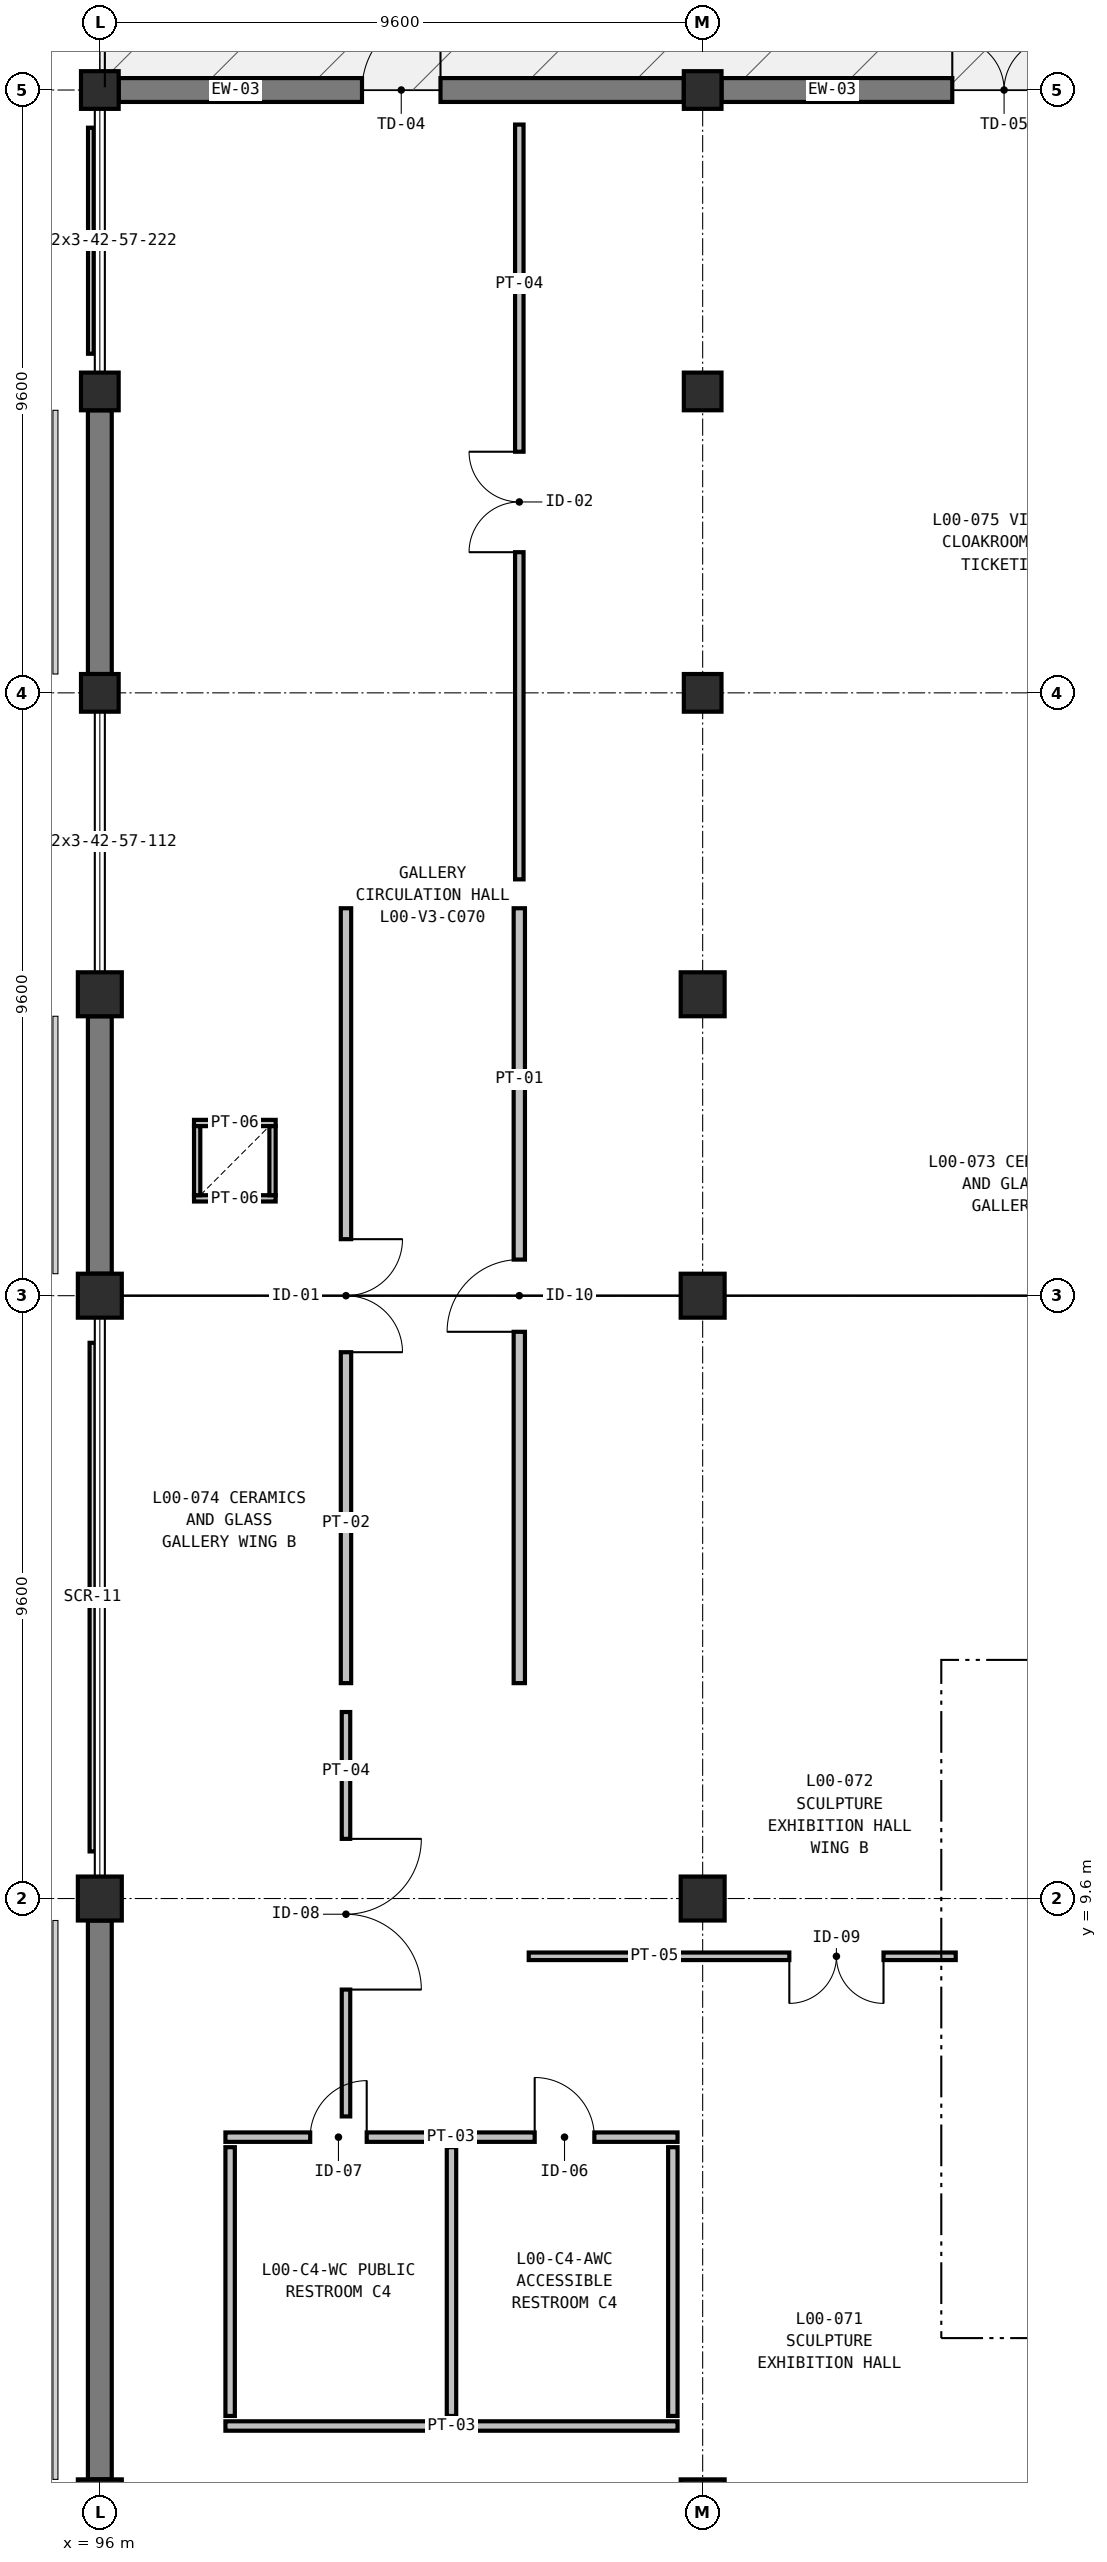
"""IFC4 building model, lengths in metres.
Left out: names, types, materials, properties, quantities, classifications, styles, units other than length and angle.
Written with IfcOpenShell. Run it as: python <this file> out.ifc"""

import sys

from ifc_helpers import new_model, si_unit, direction, frame, frame_2d, origin, origin_2d, place, context, subcontext, project, spatial, rectangle, extrude, element, fill, save


model = new_model("IFC4")
c1 = context("Model", 3, precision=1e-05, world=origin(), true_north=direction((0.0, 1.0)))
c2 = subcontext(c1, "Body", "Model", "MODEL_VIEW")
j1 = project(units=[si_unit("LENGTHUNIT", "METRE"), si_unit("PLANEANGLEUNIT", "RADIAN")], contexts=[c1])
p1 = place(None, origin())
s1 = spatial("IfcSite", under=j1, at=p1, CompositionType="ELEMENT")
p2 = place(p1, origin())
s2 = spatial("IfcBuilding", under=s1, at=p2, CompositionType="ELEMENT")
p3 = place(p2, origin())
s3 = spatial("IfcBuildingStorey", under=s2, at=p3, CompositionType="ELEMENT", Elevation=0.0)
for number, where, z_axis, x_axis in (
    (1, (96.0, 0.0, 0.0), (0.0, 0.0, 1.0), (1.0, 0.0, 0.0)),
    (2, (96.0, 9.6, 0.0), (0.0, 0.0, 1.0), (1.0, 0.0, 0.0)),
    (3, (96.0, 19.2, 0.0), (0.0, 0.0, 1.0), (1.0, 0.0, 0.0)),
    (4, (96.0, 24.0, 0.0), (0.0, 0.0, 1.0), (1.0, 0.0, 0.0)),
):
    element("IfcColumn", number, at=place(p3, frame(where, z_axis=z_axis, x_axis=x_axis)), inside=s3, PredefinedType="COLUMN", context=c2, shape_type="SweptSolid", body=[
        extrude(rectangle(XDim=0.7, YDim=0.7, at=origin_2d()), origin(), (0.0, 0.0, 1.0), 6.0),
    ])
for number, where, z_axis, x_axis in (
    (5, (96.0, 28.8, 0.0), (0.0, 0.0, 1.0), (1.0, 0.0, 0.0)),
    (6, (96.0, 33.6, 0.0), (0.0, 0.0, 1.0), (1.0, 0.0, 0.0)),
    (7, (96.0, 38.4, 0.0), (0.0, 0.0, 1.0), (1.0, 0.0, 0.0)),
):
    element("IfcColumn", number, at=place(p3, frame(where, z_axis=z_axis, x_axis=x_axis)), inside=s3, PredefinedType="COLUMN", context=c2, shape_type="SweptSolid", body=[
        extrude(rectangle(XDim=0.6, YDim=0.6, at=origin_2d()), origin(), (0.0, 0.0, 1.0), 6.0),
    ])
for number, where, z_axis, x_axis in (
    (8, (105.6, 0.0, 0.0), (0.0, 0.0, 1.0), (1.0, 0.0, 0.0)),
    (9, (105.6, 9.6, 0.0), (0.0, 0.0, 1.0), (1.0, 0.0, 0.0)),
    (10, (105.6, 19.2, 0.0), (0.0, 0.0, 1.0), (1.0, 0.0, 0.0)),
    (11, (105.6, 24.0, 0.0), (0.0, 0.0, 1.0), (1.0, 0.0, 0.0)),
):
    element("IfcColumn", number, at=place(p3, frame(where, z_axis=z_axis, x_axis=x_axis)), inside=s3, PredefinedType="COLUMN", context=c2, shape_type="SweptSolid", body=[
        extrude(rectangle(XDim=0.7, YDim=0.7, at=origin_2d()), origin(), (0.0, 0.0, 1.0), 6.0),
    ])
for number, where, z_axis, x_axis in (
    (12, (105.6, 28.8, 0.0), (0.0, 0.0, 1.0), (1.0, 0.0, 0.0)),
    (13, (105.6, 33.6, 0.0), (0.0, 0.0, 1.0), (1.0, 0.0, 0.0)),
    (14, (105.6, 38.4, 0.0), (0.0, 0.0, 1.0), (1.0, 0.0, 0.0)),
):
    element("IfcColumn", number, at=place(p3, frame(where, z_axis=z_axis, x_axis=x_axis)), inside=s3, PredefinedType="COLUMN", context=c2, shape_type="SweptSolid", body=[
        extrude(rectangle(XDim=0.6, YDim=0.6, at=origin_2d()), origin(), (0.0, 0.0, 1.0), 6.0),
    ])
p4 = place(p3, frame((96.3, 38.4, 0.0), z_axis=(0.0, 0.0, 1.0), x_axis=(1.0, 0.0, 0.0)))
e15 = element("IfcWall", 15, at=p4, inside=s3, PredefinedType="SOLIDWALL", context=c2, shape_type="SweptSolid", body=[
    extrude(rectangle(XDim=9.0, YDim=0.38, at=frame_2d((4.5, 0.0))), origin(), (0.0, 0.0, 1.0), 5.68),
])
p5 = place(p4, frame((3.875, 0.0, 0.0)))
e16 = element("IfcOpeningElement", 16, at=p5, cuts=e15, PredefinedType="OPENING", context=c2, shape_type="SweptSolid", body=[
    extrude(rectangle(XDim=1.25, YDim=2.25, at=frame_2d((0.625, 1.125))), frame((0.0, 0.2, 0.0), z_axis=(0.0, -1.0, 0.0), x_axis=(1.0, 0.0, 0.0)), (0.0, 0.0, 1.0), 0.4),
])
p6 = place(p3, frame((105.9, 38.4, 0.0), z_axis=(0.0, 0.0, 1.0), x_axis=(1.0, 0.0, 0.0)))
e17 = element("IfcWall", 17, at=p6, inside=s3, PredefinedType="SOLIDWALL", context=c2, shape_type="SweptSolid", body=[
    extrude(rectangle(XDim=9.0, YDim=0.38, at=frame_2d((4.5, 0.0))), origin(), (0.0, 0.0, 1.0), 5.68),
])
p7 = place(p6, frame((3.675, 0.0, 0.0)))
e18 = element("IfcOpeningElement", 18, at=p7, cuts=e17, PredefinedType="OPENING", context=c2, shape_type="SweptSolid", body=[
    extrude(rectangle(XDim=1.65, YDim=2.35, at=frame_2d((0.825, 1.175))), frame((0.0, 0.2, 0.0), z_axis=(0.0, -1.0, 0.0), x_axis=(1.0, 0.0, 0.0)), (0.0, 0.0, 1.0), 0.4),
])
p8 = place(p3, frame((96.0, 0.35, 0.0), z_axis=(0.0, 0.0, 1.0), x_axis=(0.0, 1.0, 0.0)))
e19 = element("IfcWall", 19, at=p8, inside=s3, PredefinedType="SOLIDWALL", context=c2, shape_type="SweptSolid", body=[
    extrude(rectangle(XDim=8.9, YDim=0.38, at=frame_2d((4.45, 0.0))), origin(), (0.0, 0.0, 1.0), 5.68),
])
p9 = place(p3, frame((96.0, 19.55, 0.0), z_axis=(0.0, 0.0, 1.0), x_axis=(0.0, 1.0, 0.0)))
e20 = element("IfcWall", 20, at=p9, inside=s3, PredefinedType="SOLIDWALL", context=c2, shape_type="SweptSolid", body=[
    extrude(rectangle(XDim=4.1, YDim=0.38, at=frame_2d((2.05, 0.0))), origin(), (0.0, 0.0, 1.0), 5.68),
])
p10 = place(p3, frame((96.0, 29.1, 0.0), z_axis=(0.0, 0.0, 1.0), x_axis=(0.0, 1.0, 0.0)))
e21 = element("IfcWall", 21, at=p10, inside=s3, PredefinedType="SOLIDWALL", context=c2, shape_type="SweptSolid", body=[
    extrude(rectangle(XDim=4.2, YDim=0.38, at=frame_2d((2.1, 0.0))), origin(), (0.0, 0.0, 1.0), 5.68),
])
p11 = place(p3, frame((98.0, 5.8, 0.0), z_axis=(0.0, 0.0, 1.0), x_axis=(1.0, 0.0, 0.0)))
e22 = element("IfcWall", 22, at=p11, inside=s3, PredefinedType="PARTITIONING", context=c2, shape_type="SweptSolid", body=[
    extrude(rectangle(XDim=7.2, YDim=0.15, at=frame_2d((3.6, 0.0))), origin(), (0.0, 0.0, 1.0), 5.68),
])
p12 = place(p11, frame((1.35, 0.0, 0.0)))
e23 = element("IfcOpeningElement", 23, at=p12, cuts=e22, PredefinedType="OPENING", context=c2, shape_type="SweptSolid", body=[
    extrude(rectangle(XDim=0.9, YDim=2.1, at=frame_2d((0.45, 1.05))), frame((0.0, 0.085, 0.0), z_axis=(0.0, -1.0, 0.0), x_axis=(1.0, 0.0, 0.0)), (0.0, 0.0, 1.0), 0.17),
])
p13 = place(p11, frame((4.925, 0.0, 0.0)))
e24 = element("IfcOpeningElement", 24, at=p13, cuts=e22, PredefinedType="OPENING", context=c2, shape_type="SweptSolid", body=[
    extrude(rectangle(XDim=0.95, YDim=2.15, at=frame_2d((0.475, 1.075))), frame((0.0, 0.085, 0.0), z_axis=(0.0, -1.0, 0.0), x_axis=(1.0, 0.0, 0.0)), (0.0, 0.0, 1.0), 0.17),
])
p14 = place(p3, frame((98.0, 1.2, 0.0), z_axis=(0.0, 0.0, 1.0), x_axis=(1.0, 0.0, 0.0)))
e25 = element("IfcWall", 25, at=p14, inside=s3, PredefinedType="PARTITIONING", context=c2, shape_type="SweptSolid", body=[
    extrude(rectangle(XDim=7.2, YDim=0.15, at=frame_2d((3.6, 0.0))), origin(), (0.0, 0.0, 1.0), 5.68),
])
for number, where, z_axis, x_axis in (
    (26, (98.075, 1.36, 0.0), (0.0, 0.0, 1.0), (0.0, 1.0, 0.0)),
    (27, (101.6, 1.36, 0.0), (0.0, 0.0, 1.0), (0.0, 1.0, 0.0)),
    (28, (105.125, 1.36, 0.0), (0.0, 0.0, 1.0), (0.0, 1.0, 0.0)),
):
    element("IfcWall", number, at=place(p3, frame(where, z_axis=z_axis, x_axis=x_axis)), inside=s3, PredefinedType="PARTITIONING", context=c2, shape_type="SweptSolid", body=[
        extrude(rectangle(XDim=4.28, YDim=0.15, at=frame_2d((2.14, 0.0))), origin(), (0.0, 0.0, 1.0), 5.055),
    ])
for number, where, z_axis, x_axis in (
    (29, (97.5, 21.95, 0.0), (0.0, 0.0, 1.0), (1.0, 0.0, 0.0)),
    (30, (98.8, 20.75, 0.0), (0.0, 0.0, 1.0), (-1.0, 0.0, 0.0)),
):
    element("IfcWall", number, at=place(p3, frame(where, z_axis=z_axis, x_axis=x_axis)), inside=s3, PredefinedType="PARTITIONING", context=c2, shape_type="SweptSolid", body=[
        extrude(rectangle(XDim=1.3, YDim=0.1, at=frame_2d((0.65, 0.0))), origin(), (0.0, 0.0, 1.0), 5.055),
    ])
for number, where, z_axis, x_axis in (
    (31, (97.55, 20.8, 0.0), (0.0, 0.0, 1.0), (0.0, 1.0, 0.0)),
    (32, (98.75, 21.9, 0.0), (0.0, 0.0, 1.0), (0.0, -1.0, 0.0)),
):
    element("IfcWall", number, at=place(p3, frame(where, z_axis=z_axis, x_axis=x_axis)), inside=s3, PredefinedType="PARTITIONING", context=c2, shape_type="SweptSolid", body=[
        extrude(rectangle(XDim=1.1, YDim=0.1, at=frame_2d((0.55, 0.0))), origin(), (0.0, 0.0, 1.0), 5.055),
    ])
p15 = place(p3, frame((99.92, 12.57, 0.0), z_axis=(0.0, 0.0, 1.0), x_axis=(0.0, -1.0, 0.0)))
e33 = element("IfcWall", 33, at=p15, inside=s3, PredefinedType="PARTITIONING", context=c2, shape_type="SweptSolid", body=[
    extrude(rectangle(XDim=6.44, YDim=0.135, at=frame_2d((3.22, 0.0))), origin(), (0.0, 0.0, 1.0), 4.905),
])
p16 = place(p15, frame((2.02, 0.0, 0.0)))
e34 = element("IfcOpeningElement", 34, at=p16, cuts=e33, PredefinedType="OPENING", context=c2, shape_type="SweptSolid", body=[
    extrude(rectangle(XDim=2.4, YDim=2.6, at=frame_2d((1.2, 1.3))), frame((0.0, 0.077, 0.0), z_axis=(0.0, -1.0, 0.0), x_axis=(1.0, 0.0, 0.0)), (0.0, 0.0, 1.0), 0.155),
])
p17 = place(p3, frame((109.63, 8.68, 0.0), z_axis=(0.0, 0.0, 1.0), x_axis=(-1.0, 0.0, 0.0)))
e35 = element("IfcWall", 35, at=p17, inside=s3, PredefinedType="PARTITIONING", context=c2, shape_type="SweptSolid", body=[
    extrude(rectangle(XDim=6.8, YDim=0.12, at=frame_2d((3.4, 0.0))), origin(), (0.0, 0.0, 1.0), 4.855),
])
p18 = place(p17, frame((1.15, 0.0, 0.0)))
e36 = element("IfcOpeningElement", 36, at=p18, cuts=e35, PredefinedType="OPENING", context=c2, shape_type="SweptSolid", body=[
    extrude(rectangle(XDim=1.5, YDim=2.3, at=frame_2d((0.75, 1.15))), frame((0.0, 0.07, 0.0), z_axis=(0.0, -1.0, 0.0), x_axis=(1.0, 0.0, 0.0)), (0.0, 0.0, 1.0), 0.14),
])
p19 = place(p3, frame((102.68, 13.03, 0.0), z_axis=(0.0, 0.0, 1.0), x_axis=(0.0, 1.0, 0.0)))
e37 = element("IfcWall", 37, at=p19, inside=s3, PredefinedType="PARTITIONING", context=c2, shape_type="SweptSolid", body=[
    extrude(rectangle(XDim=12.34, YDim=0.18, at=frame_2d((6.17, 0.0))), origin(), (0.0, 0.0, 1.0), 4.905),
])
p20 = place(p19, frame((5.595, 0.0, 0.0)))
e38 = element("IfcOpeningElement", 38, at=p20, cuts=e37, PredefinedType="OPENING", context=c2, shape_type="SweptSolid", body=[
    extrude(rectangle(XDim=1.15, YDim=2.2, at=frame_2d((0.575, 1.1))), frame((0.0, 0.1, 0.0), z_axis=(0.0, -1.0, 0.0), x_axis=(1.0, 0.0, 0.0)), (0.0, 0.0, 1.0), 0.2),
])
p21 = place(p3, frame((99.92, 25.37, 0.0), z_axis=(0.0, 0.0, 1.0), x_axis=(0.0, -1.0, 0.0)))
e39 = element("IfcWall", 39, at=p21, inside=s3, PredefinedType="PARTITIONING", context=c2, shape_type="SweptSolid", body=[
    extrude(rectangle(XDim=12.34, YDim=0.165, at=frame_2d((6.17, 0.0))), origin(), (0.0, 0.0, 1.0), 4.905),
])
p22 = place(p21, frame((5.27, 0.0, 0.0)))
e40 = element("IfcOpeningElement", 40, at=p22, cuts=e39, PredefinedType="OPENING", context=c2, shape_type="SweptSolid", body=[
    extrude(rectangle(XDim=1.8, YDim=2.4, at=frame_2d((0.9, 1.2))), frame((0.0, 0.093, 0.0), z_axis=(0.0, -1.0, 0.0), x_axis=(1.0, 0.0, 0.0)), (0.0, 0.0, 1.0), 0.185),
])
p23 = place(p3, frame((102.68, 25.83, 0.0), z_axis=(0.0, 0.0, 1.0), x_axis=(0.0, 1.0, 0.0)))
e41 = element("IfcWall", 41, at=p23, inside=s3, PredefinedType="PARTITIONING", context=c2, shape_type="SweptSolid", body=[
    extrude(rectangle(XDim=12.02, YDim=0.135, at=frame_2d((6.01, 0.0))), origin(), (0.0, 0.0, 1.0), 4.905),
])
p24 = place(p23, frame((5.21, 0.0, 0.0)))
e42 = element("IfcOpeningElement", 42, at=p24, cuts=e41, PredefinedType="OPENING", context=c2, shape_type="SweptSolid", body=[
    extrude(rectangle(XDim=1.6, YDim=2.35, at=frame_2d((0.8, 1.175))), frame((0.0, 0.077, 0.0), z_axis=(0.0, -1.0, 0.0), x_axis=(1.0, 0.0, 0.0)), (0.0, 0.0, 1.0), 0.155),
])
p25 = place(p5, origin())
e43 = element("IfcDoor", 43, at=p25, inside=s3, OperationType="SINGLE_SWING_RIGHT", PredefinedType="DOOR", context=c2, shape_type="SweptSolid", body=[
    extrude(rectangle(XDim=1.25, YDim=2.25, at=frame_2d((0.625, 1.125))), frame((0.0, 0.025, 0.0), z_axis=(0.0, -1.0, 0.0), x_axis=(1.0, 0.0, 0.0)), (0.0, 0.0, 1.0), 0.05),
])
fill(e16, e43)
p26 = place(p7, origin())
e44 = element("IfcDoor", 44, at=p26, inside=s3, OperationType="DOUBLE_DOOR_SINGLE_SWING", PredefinedType="DOOR", context=c2, shape_type="SweptSolid", body=[
    extrude(rectangle(XDim=1.65, YDim=2.35, at=frame_2d((0.825, 1.175))), frame((0.0, 0.025, 0.0), z_axis=(0.0, -1.0, 0.0), x_axis=(1.0, 0.0, 0.0)), (0.0, 0.0, 1.0), 0.05),
])
fill(e18, e44)
p27 = place(p12, origin())
e45 = element("IfcDoor", 45, at=p27, inside=s3, OperationType="SINGLE_SWING_RIGHT", PredefinedType="DOOR", context=c2, shape_type="SweptSolid", body=[
    extrude(rectangle(XDim=0.9, YDim=2.1, at=frame_2d((0.45, 1.05))), frame((0.0, 0.025, 0.0), z_axis=(0.0, -1.0, 0.0), x_axis=(1.0, 0.0, 0.0)), (0.0, 0.0, 1.0), 0.05),
])
fill(e23, e45)
p28 = place(p13, origin())
e46 = element("IfcDoor", 46, at=p28, inside=s3, OperationType="SINGLE_SWING_LEFT", PredefinedType="DOOR", context=c2, shape_type="SweptSolid", body=[
    extrude(rectangle(XDim=0.95, YDim=2.15, at=frame_2d((0.475, 1.075))), frame((0.0, 0.025, 0.0), z_axis=(0.0, -1.0, 0.0), x_axis=(1.0, 0.0, 0.0)), (0.0, 0.0, 1.0), 0.05),
])
fill(e24, e46)
p29 = place(p16, origin())
e47 = element("IfcDoor", 47, at=p29, inside=s3, OperationType="DOUBLE_DOOR_SINGLE_SWING", PredefinedType="DOOR", context=c2, shape_type="SweptSolid", body=[
    extrude(rectangle(XDim=2.4, YDim=2.6, at=frame_2d((1.2, 1.3))), frame((0.0, 0.025, 0.0), z_axis=(0.0, -1.0, 0.0), x_axis=(1.0, 0.0, 0.0)), (0.0, 0.0, 1.0), 0.05),
])
fill(e34, e47)
p30 = place(p18, origin())
e48 = element("IfcDoor", 48, at=p30, inside=s3, OperationType="DOUBLE_DOOR_SINGLE_SWING", PredefinedType="DOOR", context=c2, shape_type="SweptSolid", body=[
    extrude(rectangle(XDim=1.5, YDim=2.3, at=frame_2d((0.75, 1.15))), frame((0.0, 0.025, 0.0), z_axis=(0.0, -1.0, 0.0), x_axis=(1.0, 0.0, 0.0)), (0.0, 0.0, 1.0), 0.05),
])
fill(e36, e48)
p31 = place(p20, origin())
e49 = element("IfcDoor", 49, at=p31, inside=s3, OperationType="SINGLE_SWING_LEFT", PredefinedType="DOOR", context=c2, shape_type="SweptSolid", body=[
    extrude(rectangle(XDim=1.15, YDim=2.2, at=frame_2d((0.575, 1.1))), frame((0.0, 0.025, 0.0), z_axis=(0.0, -1.0, 0.0), x_axis=(1.0, 0.0, 0.0)), (0.0, 0.0, 1.0), 0.05),
])
fill(e38, e49)
p32 = place(p22, origin())
e50 = element("IfcDoor", 50, at=p32, inside=s3, OperationType="DOUBLE_DOOR_SINGLE_SWING", PredefinedType="DOOR", context=c2, shape_type="SweptSolid", body=[
    extrude(rectangle(XDim=1.8, YDim=2.4, at=frame_2d((0.9, 1.2))), frame((0.0, 0.025, 0.0), z_axis=(0.0, -1.0, 0.0), x_axis=(1.0, 0.0, 0.0)), (0.0, 0.0, 1.0), 0.05),
])
fill(e40, e50)
p33 = place(p24, origin())
e51 = element("IfcDoor", 51, at=p33, inside=s3, OperationType="DOUBLE_DOOR_SINGLE_SWING", PredefinedType="DOOR", context=c2, shape_type="SweptSolid", body=[
    extrude(rectangle(XDim=1.6, YDim=2.35, at=frame_2d((0.8, 1.175))), frame((0.0, 0.025, 0.0), z_axis=(0.0, -1.0, 0.0), x_axis=(1.0, 0.0, 0.0)), (0.0, 0.0, 1.0), 0.05),
])
fill(e42, e51)
save(model, sys.argv[1])
